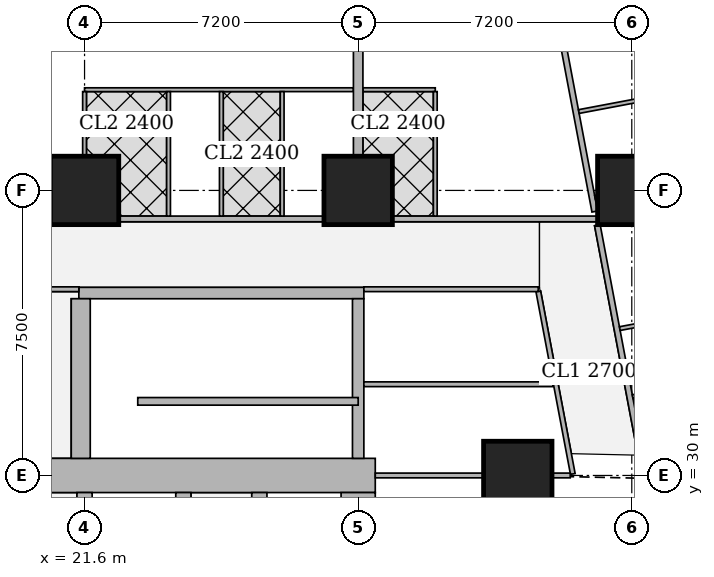
"""IFC4 building model, lengths in metres.
Left out: names, types, materials, properties, quantities, classifications, styles, units other than length and angle.
Written with IfcOpenShell. Run it as: python <this file> out.ifc"""

import sys

from ifc_helpers import new_model, si_unit, direction, frame, frame_2d, origin, origin_2d, place, context, subcontext, project, spatial, rectangle, extrude, element, fill, save


model = new_model("IFC4")
c1 = context("Model", 3, precision=1e-05, world=origin(), true_north=direction((0.0, 1.0)))
c2 = subcontext(c1, "Body", "Model", "MODEL_VIEW")
j1 = project(units=[si_unit("LENGTHUNIT", "METRE"), si_unit("PLANEANGLEUNIT", "RADIAN")], contexts=[c1])
p1 = place(None, origin())
s1 = spatial("IfcSite", under=j1, at=p1, CompositionType="ELEMENT")
p2 = place(p1, origin())
s2 = spatial("IfcBuilding", under=s1, at=p2, CompositionType="ELEMENT")
p3 = place(p2, frame((0.0, 0.0, 53.75)))
s3 = spatial("IfcBuildingStorey", under=s2, at=p3, CompositionType="ELEMENT", Elevation=53.75)
for number, where, z_axis, x_axis in (
    (1, (33.0, 30.0, 0.0), (0.0, 0.0, 1.0), (1.0, 0.0, 0.0)),
    (2, (21.6, 37.5, 0.0), (0.0, 0.0, 1.0), (1.0, 0.0, 0.0)),
    (3, (28.8, 37.5, 0.0), (0.0, 0.0, 1.0), (1.0, 0.0, 0.0)),
    (4, (36.0, 37.5, 0.0), (0.0, 0.0, 1.0), (1.0, 0.0, 0.0)),
):
    element("IfcColumn", number, at=place(p3, frame(where, z_axis=z_axis, x_axis=x_axis)), inside=s3, PredefinedType="COLUMN", context=c2, shape_type="SweptSolid", body=[
        extrude(rectangle(XDim=1.8, YDim=1.8, at=origin_2d()), origin(), (0.0, 0.0, 1.0), 3.75),
    ])
p4 = place(p3, frame((13.95, 30.0, 0.0), z_axis=(0.0, 0.0, 1.0), x_axis=(1.0, 0.0, 0.0)))
e5 = element("IfcWall", 5, at=p4, inside=s3, PredefinedType="SHEAR", context=c2, shape_type="SweptSolid", body=[
    extrude(rectangle(XDim=15.3, YDim=0.9, at=frame_2d((7.65, 0.0))), origin(), (0.0, 0.0, 1.0), 3.75),
])
p5 = place(p4, frame((4.45, 0.0, 0.0)))
e6 = element("IfcOpeningElement", 6, at=p5, cuts=e5, PredefinedType="OPENING", context=c2, shape_type="SweptSolid", body=[
    extrude(rectangle(XDim=1.8, YDim=2.1, at=frame_2d((0.9, 1.05))), frame((0.0, 0.46, 0.0), z_axis=(0.0, -1.0, 0.0), x_axis=(1.0, 0.0, 0.0)), (0.0, 0.0, 1.0), 0.92),
])
p6 = place(p4, frame((10.7, 0.0, 0.0)))
e7 = element("IfcOpeningElement", 7, at=p6, cuts=e5, PredefinedType="OPENING", context=c2, shape_type="SweptSolid", body=[
    extrude(rectangle(XDim=1.1, YDim=2.1, at=frame_2d((0.55, 1.05))), frame((0.0, 0.46, 0.0), z_axis=(0.0, -1.0, 0.0), x_axis=(1.0, 0.0, 0.0)), (0.0, 0.0, 1.0), 0.92),
])
p7 = place(p3, frame((28.8, 15.45, 0.0), z_axis=(0.0, 0.0, 1.0), x_axis=(0.0, 1.0, 0.0)))
e8 = element("IfcWall", 8, at=p7, inside=s3, PredefinedType="SHEAR", context=c2, shape_type="SweptSolid", body=[
    extrude(rectangle(XDim=14.1, YDim=0.9, at=frame_2d((7.05, 0.0))), origin(), (0.0, 0.0, 1.0), 3.75),
])
for number, where, z_axis, x_axis in (
    (9, (21.6, 15.45, 0.0), (0.0, 0.0, 1.0), (0.0, 1.0, 0.0)),
    (10, (24.2, 15.45, 0.0), (0.0, 0.0, 1.0), (0.0, 1.0, 0.0)),
):
    element("IfcWall", number, at=place(p3, frame(where, z_axis=z_axis, x_axis=x_axis)), inside=s3, PredefinedType="SHEAR", context=c2, shape_type="SweptSolid", body=[
        extrude(rectangle(XDim=14.1, YDim=0.4, at=frame_2d((7.05, 0.0))), origin(), (0.0, 0.0, 1.0), 3.75),
    ])
p8 = place(p3, frame((26.2, 26.45, 0.0), z_axis=(0.0, 0.0, 1.0), x_axis=(0.0, 1.0, 0.0)))
e11 = element("IfcWall", 11, at=p8, inside=s3, PredefinedType="SHEAR", context=c2, shape_type="SweptSolid", body=[
    extrude(rectangle(XDim=3.1, YDim=0.4, at=frame_2d((1.55, 0.0))), origin(), (0.0, 0.0, 1.0), 3.75),
])
p9 = place(p8, frame((1.075, 0.0, 0.0)))
e12 = element("IfcOpeningElement", 12, at=p9, cuts=e11, PredefinedType="OPENING", context=c2, shape_type="SweptSolid", body=[
    extrude(rectangle(XDim=1.2, YDim=2.1, at=frame_2d((0.6, 1.05))), frame((0.0, 0.21, 0.0), z_axis=(0.0, -1.0, 0.0), x_axis=(1.0, 0.0, 0.0)), (0.0, 0.0, 1.0), 0.42),
])
p10 = place(p3, frame((21.45, 34.8, 0.0), z_axis=(0.0, 0.0, 1.0), x_axis=(1.0, 0.0, 0.0)))
e13 = element("IfcWall", 13, at=p10, inside=s3, PredefinedType="SHEAR", context=c2, shape_type="SweptSolid", body=[
    extrude(rectangle(XDim=7.5, YDim=0.3, at=frame_2d((3.75, 0.0))), origin(), (0.0, 0.0, 1.0), 3.75),
])
p11 = place(p10, frame((0.5, 0.0, 0.0)))
e14 = element("IfcOpeningElement", 14, at=p11, cuts=e13, PredefinedType="OPENING", context=c2, shape_type="SweptSolid", body=[
    extrude(rectangle(XDim=1.1, YDim=2.1, at=frame_2d((0.55, 1.05))), frame((0.0, 0.16, 0.0), z_axis=(0.0, -1.0, 0.0), x_axis=(1.0, 0.0, 0.0)), (0.0, 0.0, 1.0), 0.32),
])
p12 = place(p3, frame((21.5, 30.45, 0.0), z_axis=(0.0, 0.0, 1.0), x_axis=(0.0, 1.0, 0.0)))
e15 = element("IfcWall", 15, at=p12, inside=s3, PredefinedType="SHEAR", context=c2, shape_type="SweptSolid", body=[
    extrude(rectangle(XDim=4.2, YDim=0.5, at=frame_2d((2.1, 0.0))), origin(), (0.0, 0.0, 1.0), 3.75),
])
p13 = place(p3, frame((28.8, 30.45, 0.0), z_axis=(0.0, 0.0, 1.0), x_axis=(0.0, 1.0, 0.0)))
e16 = element("IfcWall", 16, at=p13, inside=s3, PredefinedType="SHEAR", context=c2, shape_type="SweptSolid", body=[
    extrude(rectangle(XDim=4.2, YDim=0.3, at=frame_2d((2.1, 0.0))), origin(), (0.0, 0.0, 1.0), 3.75),
])
p14 = place(p3, frame((22.501, 36.75, 0.0), z_axis=(0.0, 0.0, 1.0), x_axis=(1.0, 0.0, 0.0)))
e17 = element("IfcWall", 17, at=p14, inside=s3, PredefinedType="SOLIDWALL", context=c2, shape_type="SweptSolid", body=[
    extrude(rectangle(XDim=5.398, YDim=0.15, at=frame_2d((2.699, 0.0))), origin(), (0.0, 0.0, 1.0), 3.5),
])
p15 = place(p3, frame((29.701, 36.75, 0.0), z_axis=(0.0, 0.0, 1.0), x_axis=(1.0, 0.0, 0.0)))
e18 = element("IfcWall", 18, at=p15, inside=s3, PredefinedType="SOLIDWALL", context=c2, shape_type="SweptSolid", body=[
    extrude(rectangle(XDim=5.399, YDim=0.15, at=frame_2d((2.7, 0.0))), origin(), (0.0, 0.0, 1.0), 3.5),
])
p16 = place(p15, frame((2.745, 0.0, 0.0)))
e19 = element("IfcOpeningElement", 19, at=p16, cuts=e18, PredefinedType="OPENING", context=c2, shape_type="SweptSolid", body=[
    extrude(rectangle(XDim=1.0, YDim=2.1, at=frame_2d((0.5, 1.05))), frame((0.0, 0.085, 0.0), z_axis=(0.0, -1.0, 0.0), x_axis=(1.0, 0.0, 0.0)), (0.0, 0.0, 1.0), 0.17),
])
p17 = place(p3, frame((33.933, 42.73, 0.0), z_axis=(0.0, 0.0, 1.0), x_axis=(0.185617897238, -0.982622000682, 0.0)))
e20 = element("IfcWall", 20, at=p17, inside=s3, PredefinedType="SOLIDWALL", context=c2, shape_type="SweptSolid", body=[
    extrude(rectangle(XDim=5.887, YDim=0.15, at=frame_2d((2.944, 0.0))), origin(), (0.0, 0.0, 1.0), 3.5),
])
p18 = place(p3, frame((35.094, 36.585, 0.0), z_axis=(0.0, 0.0, 1.0), x_axis=(0.185588860311, -0.982627485331, 0.0)))
e21 = element("IfcWall", 21, at=p18, inside=s3, PredefinedType="SOLIDWALL", context=c2, shape_type="SweptSolid", body=[
    extrude(rectangle(XDim=34.797, YDim=0.15, at=frame_2d((17.399, 0.0))), origin(), (0.0, 0.0, 1.0), 2.5),
])
p19 = place(p18, frame((9.828, 0.0, 0.0)))
e22 = element("IfcOpeningElement", 22, at=p19, cuts=e21, PredefinedType="OPENING", context=c2, shape_type="SweptSolid", body=[
    extrude(rectangle(XDim=1.0, YDim=2.1, at=frame_2d((0.5, 1.05))), frame((0.0, 0.085, 0.0), z_axis=(0.0, -1.0, 0.0), x_axis=(1.0, 0.0, 0.0)), (0.0, 0.0, 1.0), 0.17),
])
p20 = place(p18, frame((13.645, 0.0, 0.0)))
e23 = element("IfcOpeningElement", 23, at=p20, cuts=e21, PredefinedType="OPENING", context=c2, shape_type="SweptSolid", body=[
    extrude(rectangle(XDim=1.0, YDim=2.1, at=frame_2d((0.5, 1.05))), frame((0.0, 0.085, 0.0), z_axis=(0.0, -1.0, 0.0), x_axis=(1.0, 0.0, 0.0)), (0.0, 0.0, 1.0), 0.17),
])
p21 = place(p18, frame((25.9, 0.0, 0.0)))
e24 = element("IfcOpeningElement", 24, at=p21, cuts=e21, PredefinedType="OPENING", context=c2, shape_type="SweptSolid", body=[
    extrude(rectangle(XDim=1.0, YDim=2.1, at=frame_2d((0.5, 1.05))), frame((0.0, 0.085, 0.0), z_axis=(0.0, -1.0, 0.0), x_axis=(1.0, 0.0, 0.0)), (0.0, 0.0, 1.0), 0.17),
])
p22 = place(p3, frame((37.823, 40.182, 0.0), z_axis=(0.0, 0.0, 1.0), x_axis=(-0.982664729897, -0.18539155487, 0.0)))
e25 = element("IfcWall", 25, at=p22, inside=s3, PredefinedType="PARTITIONING", context=c2, shape_type="SweptSolid", body=[
    extrude(rectangle(XDim=3.274, YDim=0.1, at=frame_2d((1.637, 0.0))), origin(), (0.0, 0.0, 1.0), 3.5),
])
p23 = place(p3, frame((35.09, 37.328, 0.0), z_axis=(0.0, 0.0, 1.0), x_axis=(-0.982590620415, -0.185783940835, 0.0)))
e26 = element("IfcWall", 26, at=p23, inside=s3, PredefinedType="PARTITIONING", context=c2, shape_type="SweptSolid", body=[
    extrude(rectangle(XDim=0.059, YDim=0.1, at=frame_2d((0.03, 0.0))), origin(), (0.0, 0.0, 1.0), 3.5),
])
p24 = place(p3, frame((39.24, 32.683, 0.0), z_axis=(0.0, 0.0, 1.0), x_axis=(-0.982607026909, -0.185697147715, 0.0)))
e27 = element("IfcWall", 27, at=p24, inside=s3, PredefinedType="PARTITIONING", context=c2, shape_type="SweptSolid", body=[
    extrude(rectangle(XDim=3.275, YDim=0.1, at=frame_2d((1.637, 0.0))), origin(), (0.0, 0.0, 1.0), 3.5),
])
p25 = place(p3, frame((38.902, 34.471, 0.0), z_axis=(0.0, 0.0, 1.0), x_axis=(-0.982674977865, -0.185337227447, 0.0)))
e28 = element("IfcWall", 28, at=p25, inside=s3, PredefinedType="PARTITIONING", context=c2, shape_type="SweptSolid", body=[
    extrude(rectangle(XDim=3.275, YDim=0.1, at=frame_2d((1.637, 0.0))), origin(), (0.0, 0.0, 1.0), 3.5),
])
p26 = place(p3, frame((21.6, 40.15, 0.0), z_axis=(0.0, 0.0, 1.0), x_axis=(1.0, 0.0, 0.0)))
e29 = element("IfcWall", 29, at=p26, inside=s3, PredefinedType="PARTITIONING", context=c2, shape_type="SweptSolid", body=[
    extrude(rectangle(XDim=7.075, YDim=0.1, at=frame_2d((3.538, 0.0))), origin(), (0.0, 0.0, 1.0), 3.5),
])
p27 = place(p26, frame((0.655, 0.0, 0.0)))
e30 = element("IfcOpeningElement", 30, at=p27, cuts=e29, PredefinedType="OPENING", context=c2, shape_type="SweptSolid", body=[
    extrude(rectangle(XDim=0.9, YDim=2.1, at=frame_2d((0.45, 1.05))), frame((0.0, 0.06, 0.0), z_axis=(0.0, -1.0, 0.0), x_axis=(1.0, 0.0, 0.0)), (0.0, 0.0, 1.0), 0.12),
])
p28 = place(p26, frame((3.95, 0.0, 0.0)))
e31 = element("IfcOpeningElement", 31, at=p28, cuts=e29, PredefinedType="OPENING", context=c2, shape_type="SweptSolid", body=[
    extrude(rectangle(XDim=0.9, YDim=2.1, at=frame_2d((0.45, 1.05))), frame((0.0, 0.06, 0.0), z_axis=(0.0, -1.0, 0.0), x_axis=(1.0, 0.0, 0.0)), (0.0, 0.0, 1.0), 0.12),
])
p29 = place(p26, frame((2.455, 0.0, 0.0)))
e32 = element("IfcOpeningElement", 32, at=p29, cuts=e29, PredefinedType="OPENING", context=c2, shape_type="SweptSolid", body=[
    extrude(rectangle(XDim=0.9, YDim=2.1, at=frame_2d((0.45, 1.05))), frame((0.0, 0.06, 0.0), z_axis=(0.0, -1.0, 0.0), x_axis=(1.0, 0.0, 0.0)), (0.0, 0.0, 1.0), 0.12),
])
p30 = place(p26, frame((5.75, 0.0, 0.0)))
e33 = element("IfcOpeningElement", 33, at=p30, cuts=e29, PredefinedType="OPENING", context=c2, shape_type="SweptSolid", body=[
    extrude(rectangle(XDim=0.9, YDim=2.1, at=frame_2d((0.45, 1.05))), frame((0.0, 0.06, 0.0), z_axis=(0.0, -1.0, 0.0), x_axis=(1.0, 0.0, 0.0)), (0.0, 0.0, 1.0), 0.12),
])
p31 = place(p3, frame((21.6, 38.401, 0.0), z_axis=(0.0, 0.0, 1.0), x_axis=(0.0, 1.0, 0.0)))
e34 = element("IfcWall", 34, at=p31, inside=s3, PredefinedType="PARTITIONING", context=c2, shape_type="SweptSolid", body=[
    extrude(rectangle(XDim=1.699, YDim=0.1, at=frame_2d((0.85, 0.0))), origin(), (0.0, 0.0, 1.0), 3.5),
])
for number, where, z_axis, x_axis in (
    (35, (25.2, 36.825, 0.0), (0.0, 0.0, 1.0), (0.0, 1.0, 0.0)),
    (36, (23.81, 36.825, 0.0), (0.0, 0.0, 1.0), (0.0, 1.0, 0.0)),
    (37, (26.8, 36.825, 0.0), (0.0, 0.0, 1.0), (0.0, 1.0, 0.0)),
):
    element("IfcWall", number, at=place(p3, frame(where, z_axis=z_axis, x_axis=x_axis)), inside=s3, PredefinedType="PARTITIONING", context=c2, shape_type="SweptSolid", body=[
        extrude(rectangle(XDim=3.275, YDim=0.1, at=frame_2d((1.638, 0.0))), origin(), (0.0, 0.0, 1.0), 3.5),
    ])
p32 = place(p3, frame((28.925, 40.15, 0.0), z_axis=(0.0, 0.0, 1.0), x_axis=(1.0, 0.0, 0.0)))
e38 = element("IfcWall", 38, at=p32, inside=s3, PredefinedType="PARTITIONING", context=c2, shape_type="SweptSolid", body=[
    extrude(rectangle(XDim=1.904, YDim=0.1, at=frame_2d((0.952, 0.0))), origin(), (0.0, 0.0, 1.0), 3.5),
])
p33 = place(p32, frame((0.425, 0.0, 0.0)))
e39 = element("IfcOpeningElement", 39, at=p33, cuts=e38, PredefinedType="OPENING", context=c2, shape_type="SweptSolid", body=[
    extrude(rectangle(XDim=0.9, YDim=2.1, at=frame_2d((0.45, 1.05))), frame((0.0, 0.06, 0.0), z_axis=(0.0, -1.0, 0.0), x_axis=(1.0, 0.0, 0.0)), (0.0, 0.0, 1.0), 0.12),
])
p34 = place(p3, frame((30.829, 36.825, 0.0), z_axis=(0.0, 0.0, 1.0), x_axis=(0.0, 1.0, 0.0)))
e40 = element("IfcWall", 40, at=p34, inside=s3, PredefinedType="PARTITIONING", context=c2, shape_type="SweptSolid", body=[
    extrude(rectangle(XDim=3.275, YDim=0.1, at=frame_2d((1.638, 0.0))), origin(), (0.0, 0.0, 1.0), 3.5),
])
p35 = place(p3, frame((28.8, 38.401, 0.0), z_axis=(0.0, 0.0, 1.0), x_axis=(0.0, 1.0, 0.0)))
e41 = element("IfcWall", 41, at=p35, inside=s3, PredefinedType="SOLIDWALL", context=c2, shape_type="SweptSolid", body=[
    extrude(rectangle(XDim=2.949, YDim=0.25, at=frame_2d((1.475, 0.0))), origin(), (0.0, 0.0, 1.0), 3.5),
])
p36 = place(p3, frame((10.163, 34.9, 0.0), z_axis=(0.0, 0.0, 1.0), x_axis=(1.0, 0.0, 0.0)))
e42 = element("IfcWall", 42, at=p36, inside=s3, PredefinedType="PARTITIONING", context=c2, shape_type="SweptSolid", body=[
    extrude(rectangle(XDim=11.287, YDim=0.125, at=frame_2d((5.644, 0.0))), origin(), (0.0, 0.0, 1.0), 3.5),
])
p37 = place(p36, frame((7.737, 0.0, 0.0)))
e43 = element("IfcOpeningElement", 43, at=p37, cuts=e42, PredefinedType="OPENING", context=c2, shape_type="SweptSolid", body=[
    extrude(rectangle(XDim=1.8, YDim=2.1, at=frame_2d((0.9, 1.05))), frame((0.0, 0.073, 0.0), z_axis=(0.0, -1.0, 0.0), x_axis=(1.0, 0.0, 0.0)), (0.0, 0.0, 1.0), 0.145),
])
p38 = place(p3, frame((28.95, 34.9, 0.0), z_axis=(0.0, 0.0, 1.0), x_axis=(1.0, 0.0, 0.0)))
e44 = element("IfcWall", 44, at=p38, inside=s3, PredefinedType="PARTITIONING", context=c2, shape_type="SweptSolid", body=[
    extrude(rectangle(XDim=4.588, YDim=0.125, at=frame_2d((2.294, 0.0))), origin(), (0.0, 0.0, 1.0), 3.5),
])
p39 = place(p3, frame((34.448, 30.04, 0.0), z_axis=(0.0, 0.0, 1.0), x_axis=(-0.185749459238, 0.982597139418, 0.0)))
e45 = element("IfcWall", 45, at=p39, inside=s3, PredefinedType="PARTITIONING", context=c2, shape_type="SweptSolid", body=[
    extrude(rectangle(XDim=4.883, YDim=0.125, at=frame_2d((2.441, 0.0))), origin(), (0.0, 0.0, 1.0), 2.5),
])
p40 = place(p39, frame((1.15, 0.0, 0.0)))
e46 = element("IfcOpeningElement", 46, at=p40, cuts=e45, PredefinedType="OPENING", context=c2, shape_type="SweptSolid", body=[
    extrude(rectangle(XDim=1.0, YDim=2.1, at=frame_2d((0.5, 1.05))), frame((0.0, 0.073, 0.0), z_axis=(0.0, -1.0, 0.0), x_axis=(1.0, 0.0, 0.0)), (0.0, 0.0, 1.0), 0.145),
])
p41 = place(p39, frame((3.225, 0.0, 0.0)))
e47 = element("IfcOpeningElement", 47, at=p41, cuts=e45, PredefinedType="OPENING", context=c2, shape_type="SweptSolid", body=[
    extrude(rectangle(XDim=1.0, YDim=2.1, at=frame_2d((0.5, 1.05))), frame((0.0, 0.073, 0.0), z_axis=(0.0, -1.0, 0.0), x_axis=(1.0, 0.0, 0.0)), (0.0, 0.0, 1.0), 0.145),
])
p42 = place(p3, frame((29.25, 30.0, 0.0), z_axis=(0.0, 0.0, 1.0), x_axis=(1.0, 0.0, 0.0)))
e48 = element("IfcWall", 48, at=p42, inside=s3, PredefinedType="PARTITIONING", context=c2, shape_type="SweptSolid", body=[
    extrude(rectangle(XDim=2.849, YDim=0.125, at=frame_2d((1.425, 0.0))), origin(), (0.0, 0.0, 1.0), 3.5),
])
p43 = place(p3, frame((33.901, 30.0, 0.0), z_axis=(0.0, 0.0, 1.0), x_axis=(1.0, 0.0, 0.0)))
e49 = element("IfcWall", 49, at=p43, inside=s3, PredefinedType="PARTITIONING", context=c2, shape_type="SweptSolid", body=[
    extrude(rectangle(XDim=0.479, YDim=0.125, at=frame_2d((0.24, 0.0))), origin(), (0.0, 0.0, 1.0), 2.5),
])
p44 = place(p3, frame((28.95, 32.4, 0.0), z_axis=(0.0, 0.0, 1.0), x_axis=(1.0, 0.0, 0.0)))
e50 = element("IfcWall", 50, at=p44, inside=s3, PredefinedType="PARTITIONING", context=c2, shape_type="SweptSolid", body=[
    extrude(rectangle(XDim=4.976, YDim=0.125, at=frame_2d((2.488, 0.0))), origin(), (0.0, 0.0, 1.0), 3.5),
])
p45 = place(p3, frame((23.0, 31.95, 0.0), z_axis=(0.0, 0.0, 1.0), x_axis=(1.0, 0.0, 0.0)))
e51 = element("IfcWall", 51, at=p45, inside=s3, PredefinedType="SHEAR", context=c2, shape_type="SweptSolid", body=[
    extrude(rectangle(XDim=5.8, YDim=0.2, at=frame_2d((2.9, 0.0))), origin(), (0.0, 0.0, 1.0), 3.75),
])
p46 = place(p27, origin())
e52 = element("IfcDoor", 52, at=p46, inside=s3, OperationType="SINGLE_SWING_RIGHT", PredefinedType="DOOR", context=c2, shape_type="SweptSolid", body=[
    extrude(rectangle(XDim=0.9, YDim=2.1, at=frame_2d((0.45, 1.05))), frame((0.0, 0.025, 0.0), z_axis=(0.0, -1.0, 0.0), x_axis=(1.0, 0.0, 0.0)), (0.0, 0.0, 1.0), 0.05),
])
fill(e30, e52)
p47 = place(p28, origin())
e53 = element("IfcDoor", 53, at=p47, inside=s3, OperationType="SINGLE_SWING_LEFT", PredefinedType="DOOR", context=c2, shape_type="SweptSolid", body=[
    extrude(rectangle(XDim=0.9, YDim=2.1, at=frame_2d((0.45, 1.05))), frame((0.0, 0.025, 0.0), z_axis=(0.0, -1.0, 0.0), x_axis=(1.0, 0.0, 0.0)), (0.0, 0.0, 1.0), 0.05),
])
fill(e31, e53)
p48 = place(p29, origin())
e54 = element("IfcDoor", 54, at=p48, inside=s3, OperationType="SINGLE_SWING_LEFT", PredefinedType="DOOR", context=c2, shape_type="SweptSolid", body=[
    extrude(rectangle(XDim=0.9, YDim=2.1, at=frame_2d((0.45, 1.05))), frame((0.0, 0.025, 0.0), z_axis=(0.0, -1.0, 0.0), x_axis=(1.0, 0.0, 0.0)), (0.0, 0.0, 1.0), 0.05),
])
fill(e32, e54)
p49 = place(p30, origin())
e55 = element("IfcDoor", 55, at=p49, inside=s3, OperationType="SINGLE_SWING_LEFT", PredefinedType="DOOR", context=c2, shape_type="SweptSolid", body=[
    extrude(rectangle(XDim=0.9, YDim=2.1, at=frame_2d((0.45, 1.05))), frame((0.0, 0.025, 0.0), z_axis=(0.0, -1.0, 0.0), x_axis=(1.0, 0.0, 0.0)), (0.0, 0.0, 1.0), 0.05),
])
fill(e33, e55)
p50 = place(p33, origin())
e56 = element("IfcDoor", 56, at=p50, inside=s3, OperationType="SINGLE_SWING_RIGHT", PredefinedType="DOOR", context=c2, shape_type="SweptSolid", body=[
    extrude(rectangle(XDim=0.9, YDim=2.1, at=frame_2d((0.45, 1.05))), frame((0.0, 0.025, 0.0), z_axis=(0.0, -1.0, 0.0), x_axis=(1.0, 0.0, 0.0)), (0.0, 0.0, 1.0), 0.05),
])
fill(e39, e56)
p51 = place(p16, origin())
e57 = element("IfcDoor", 57, at=p51, inside=s3, OperationType="SINGLE_SWING_RIGHT", PredefinedType="DOOR", context=c2, shape_type="SweptSolid", body=[
    extrude(rectangle(XDim=1.0, YDim=2.1, at=frame_2d((0.5, 1.05))), frame((0.0, 0.025, 0.0), z_axis=(0.0, -1.0, 0.0), x_axis=(1.0, 0.0, 0.0)), (0.0, 0.0, 1.0), 0.05),
])
fill(e19, e57)
p52 = place(p40, origin())
e58 = element("IfcDoor", 58, at=p52, inside=s3, OperationType="SINGLE_SWING_RIGHT", PredefinedType="DOOR", context=c2, shape_type="SweptSolid", body=[
    extrude(rectangle(XDim=1.0, YDim=2.1, at=frame_2d((0.5, 1.05))), frame((0.0, 0.025, 0.0), z_axis=(0.0, -1.0, 0.0), x_axis=(1.0, 0.0, 0.0)), (0.0, 0.0, 1.0), 0.05),
])
fill(e46, e58)
p53 = place(p41, origin())
e59 = element("IfcDoor", 59, at=p53, inside=s3, OperationType="SINGLE_SWING_RIGHT", PredefinedType="DOOR", context=c2, shape_type="SweptSolid", body=[
    extrude(rectangle(XDim=1.0, YDim=2.1, at=frame_2d((0.5, 1.05))), frame((0.0, 0.025, 0.0), z_axis=(0.0, -1.0, 0.0), x_axis=(1.0, 0.0, 0.0)), (0.0, 0.0, 1.0), 0.05),
])
fill(e47, e59)
p54 = place(p6, origin())
e60 = element("IfcDoor", 60, at=p54, inside=s3, OperationType="SINGLE_SWING_LEFT", PredefinedType="DOOR", context=c2, shape_type="SweptSolid", body=[
    extrude(rectangle(XDim=1.1, YDim=2.1, at=frame_2d((0.55, 1.05))), frame((0.0, 0.025, 0.0), z_axis=(0.0, -1.0, 0.0), x_axis=(1.0, 0.0, 0.0)), (0.0, 0.0, 1.0), 0.05),
])
fill(e7, e60)
p55 = place(p11, origin())
e61 = element("IfcDoor", 61, at=p55, inside=s3, OperationType="SINGLE_SWING_RIGHT", PredefinedType="DOOR", context=c2, shape_type="SweptSolid", body=[
    extrude(rectangle(XDim=1.1, YDim=2.1, at=frame_2d((0.55, 1.05))), frame((0.0, 0.025, 0.0), z_axis=(0.0, -1.0, 0.0), x_axis=(1.0, 0.0, 0.0)), (0.0, 0.0, 1.0), 0.05),
])
fill(e14, e61)
save(model, sys.argv[1])
